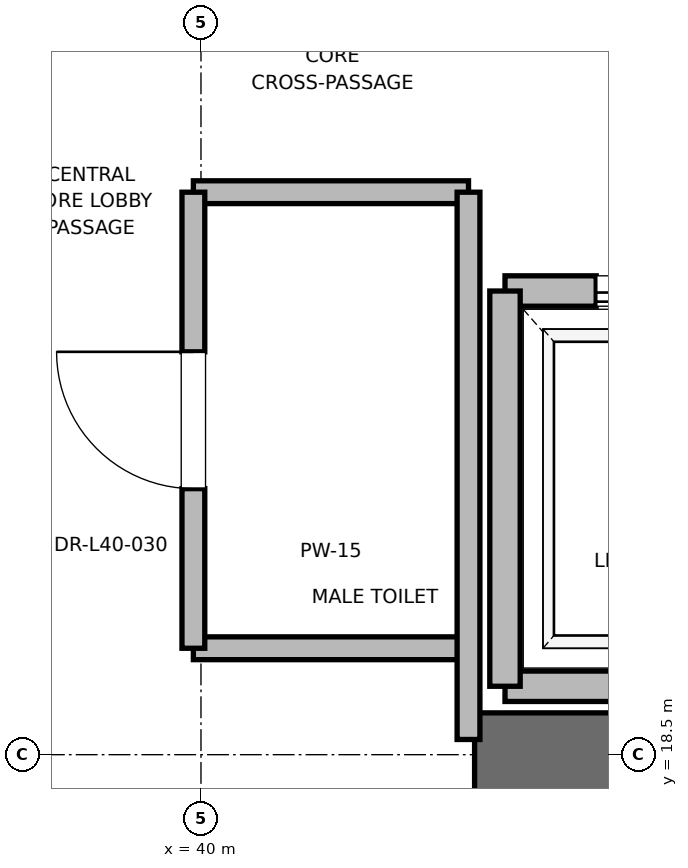
"""IFC4 building model, lengths in metres.
Left out: names, types, materials, properties, quantities, classifications, styles, units other than length and angle.
Written with IfcOpenShell. Run it as: python <this file> out.ifc"""

import sys

from ifc_helpers import new_model, si_unit, direction, frame, frame_2d, origin, place, context, subcontext, project, spatial, rectangle, extrude, element, fill, save


model = new_model("IFC4")
c1 = context("Model", 3, precision=1e-05, world=origin(), true_north=direction((0.0, 1.0)))
c2 = subcontext(c1, "Body", "Model", "MODEL_VIEW")
j1 = project(units=[si_unit("LENGTHUNIT", "METRE"), si_unit("PLANEANGLEUNIT", "RADIAN")], contexts=[c1])
p1 = place(None, origin())
s1 = spatial("IfcSite", under=j1, at=p1, CompositionType="ELEMENT")
p2 = place(p1, origin())
s2 = spatial("IfcBuilding", under=s1, at=p2, CompositionType="ELEMENT")
p3 = place(p2, frame((0.0, 0.0, 172.4)))
s3 = spatial("IfcBuildingStorey", under=s2, at=p3, CompositionType="ELEMENT", Elevation=172.4)
p4 = place(p3, frame((41.8, 18.5, 0.0), z_axis=(0.0, 0.0, 1.0), x_axis=(1.0, 0.0, 0.0)))
e1 = element("IfcWall", 1, at=p4, inside=s3, PredefinedType="SHEAR", context=c2, shape_type="SweptSolid", body=[
    extrude(rectangle(XDim=9.2, YDim=0.55, at=frame_2d((4.6, 0.0))), origin(), (0.0, 0.0, 1.0), 3.775),
])
p5 = place(p3, frame((42.0, 18.95, 0.0), z_axis=(0.0, 0.0, 1.0), x_axis=(1.0, 0.0, 0.0)))
e2 = element("IfcWall", 2, at=p5, inside=s3, PredefinedType="SOLIDWALL", context=c2, shape_type="SweptSolid", body=[
    extrude(rectangle(XDim=2.3, YDim=0.2, at=frame_2d((1.15, 0.0))), origin(), (0.0, 0.0, 1.0), 2.755),
])
p6 = place(p3, frame((44.3, 21.55, 0.0), z_axis=(0.0, 0.0, 1.0), x_axis=(-1.0, 0.0, 0.0)))
e3 = element("IfcWall", 3, at=p6, inside=s3, PredefinedType="SOLIDWALL", context=c2, shape_type="SweptSolid", body=[
    extrude(rectangle(XDim=2.3, YDim=0.2, at=frame_2d((1.15, 0.0))), origin(), (0.0, 0.0, 1.0), 3.775),
])
p7 = place(p6, frame((0.6, 0.0, 0.0)))
e4 = element("IfcOpeningElement", 4, at=p7, cuts=e3, PredefinedType="OPENING", context=c2, shape_type="SweptSolid", body=[
    extrude(rectangle(XDim=1.1, YDim=2.2, at=frame_2d((0.55, 1.1))), frame((0.0, 0.1, 0.0), z_axis=(0.0, -1.0, 0.0), x_axis=(1.0, 0.0, 0.0)), (0.0, 0.0, 1.0), 0.2),
])
p8 = place(p3, frame((42.0, 21.55, 0.0), z_axis=(0.0, 0.0, 1.0), x_axis=(0.0, -1.0, 0.0)))
e5 = element("IfcWall", 5, at=p8, inside=s3, PredefinedType="SOLIDWALL", context=c2, shape_type="SweptSolid", body=[
    extrude(rectangle(XDim=2.6, YDim=0.2, at=frame_2d((1.3, 0.0))), origin(), (0.0, 0.0, 1.0), 2.755),
])
for number, where, z_axis, x_axis in (
    (6, (39.95, 19.2, 0.0), (0.0, 0.0, 1.0), (1.0, 0.0, 0.0)),
    (7, (39.95, 22.2, 0.0), (0.0, 0.0, 1.0), (1.0, 0.0, 0.0)),
):
    element("IfcWall", number, at=place(p3, frame(where, z_axis=z_axis, x_axis=x_axis)), inside=s3, PredefinedType="PARTITIONING", context=c2, shape_type="SweptSolid", body=[
        extrude(rectangle(XDim=1.81, YDim=0.15, at=frame_2d((0.905, 0.0))), origin(), (0.0, 0.0, 1.0), 2.85),
    ])
p9 = place(p3, frame((41.76, 18.6, 0.0), z_axis=(0.0, 0.0, 1.0), x_axis=(0.0, 1.0, 0.0)))
e8 = element("IfcWall", 8, at=p9, inside=s3, PredefinedType="PARTITIONING", context=c2, shape_type="SweptSolid", body=[
    extrude(rectangle(XDim=3.6, YDim=0.15, at=frame_2d((1.8, 0.0))), origin(), (0.0, 0.0, 1.0), 2.755),
])
p10 = place(p3, frame((39.95, 19.2, 0.0), z_axis=(0.0, 0.0, 1.0), x_axis=(0.0, 1.0, 0.0)))
e9 = element("IfcWall", 9, at=p10, inside=s3, PredefinedType="PARTITIONING", context=c2, shape_type="SweptSolid", body=[
    extrude(rectangle(XDim=3.0, YDim=0.15, at=frame_2d((1.5, 0.0))), origin(), (0.0, 0.0, 1.0), 2.85),
])
p11 = place(p10, frame((1.05, 0.0, 0.0)))
e10 = element("IfcOpeningElement", 10, at=p11, cuts=e9, PredefinedType="OPENING", context=c2, shape_type="SweptSolid", body=[
    extrude(rectangle(XDim=0.9, YDim=2.1, at=frame_2d((0.45, 1.05))), frame((0.0, 0.075, 0.0), z_axis=(0.0, -1.0, 0.0), x_axis=(1.0, 0.0, 0.0)), (0.0, 0.0, 1.0), 0.15),
])
p12 = place(p7, origin())
e11 = element("IfcDoor", 11, at=p12, inside=s3, OperationType="SLIDING_TO_RIGHT", PredefinedType="DOOR", context=c2, shape_type="SweptSolid", body=[
    extrude(rectangle(XDim=1.1, YDim=2.2, at=frame_2d((0.55, 1.1))), frame((0.0, 0.025, 0.0), z_axis=(0.0, -1.0, 0.0), x_axis=(1.0, 0.0, 0.0)), (0.0, 0.0, 1.0), 0.05),
])
fill(e4, e11)
p13 = place(p11, origin())
e12 = element("IfcDoor", 12, at=p13, inside=s3, OperationType="SINGLE_SWING_RIGHT", PredefinedType="DOOR", context=c2, shape_type="SweptSolid", body=[
    extrude(rectangle(XDim=0.9, YDim=2.1, at=frame_2d((0.45, 1.05))), frame((0.0, 0.025, 0.0), z_axis=(0.0, -1.0, 0.0), x_axis=(1.0, 0.0, 0.0)), (0.0, 0.0, 1.0), 0.05),
])
fill(e10, e12)
save(model, sys.argv[1])
